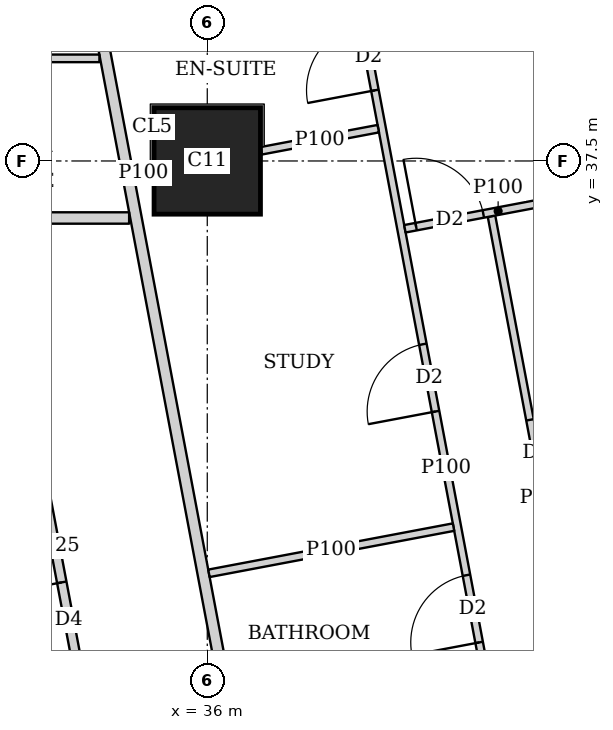
"""IFC4 building model, lengths in metres.
Left out: names, types, materials, properties, quantities, classifications, styles, units other than length and angle.
Written with IfcOpenShell. Run it as: python <this file> out.ifc"""

import sys

from ifc_helpers import new_model, si_unit, direction, frame, frame_2d, origin, origin_2d, place, context, subcontext, project, spatial, rectangle, extrude, element, fill, save


model = new_model("IFC4")
c1 = context("Model", 3, precision=1e-05, world=origin(), true_north=direction((0.0, 1.0)))
c2 = subcontext(c1, "Body", "Model", "MODEL_VIEW")
j1 = project(units=[si_unit("LENGTHUNIT", "METRE"), si_unit("PLANEANGLEUNIT", "RADIAN")], contexts=[c1])
p1 = place(None, origin())
s1 = spatial("IfcSite", under=j1, at=p1, CompositionType="ELEMENT")
p2 = place(p1, origin())
s2 = spatial("IfcBuilding", under=s1, at=p2, CompositionType="ELEMENT")
p3 = place(p2, frame((0.0, 0.0, 289.1)))
s3 = spatial("IfcBuildingStorey", under=s2, at=p3, CompositionType="ELEMENT", Elevation=289.1)
p4 = place(p3, frame((36.0, 37.5, 0.0), z_axis=(0.0, 0.0, 1.0), x_axis=(1.0, 0.0, 0.0)))
e1 = element("IfcColumn", 1, at=p4, inside=s3, PredefinedType="COLUMN", context=c2, shape_type="SweptSolid", body=[
    extrude(rectangle(XDim=1.4, YDim=1.4, at=origin_2d()), origin(), (0.0, 0.0, 1.0), 3.75),
])
p5 = place(p3, frame((29.501, 36.75, 0.0), z_axis=(0.0, 0.0, 1.0), x_axis=(1.0, 0.0, 0.0)))
e2 = element("IfcWall", 2, at=p5, inside=s3, PredefinedType="SOLIDWALL", context=c2, shape_type="SweptSolid", body=[
    extrude(rectangle(XDim=5.471, YDim=0.15, at=frame_2d((2.735, 0.0))), origin(), (0.0, 0.0, 1.0), 3.5),
])
p6 = place(p3, frame((34.036, 42.186, 0.0), z_axis=(0.0, 0.0, 1.0), x_axis=(0.185593518645, -0.9826266055, 0.0)))
e3 = element("IfcWall", 3, at=p6, inside=s3, PredefinedType="SOLIDWALL", context=c2, shape_type="SweptSolid", body=[
    extrude(rectangle(XDim=35.961, YDim=0.15, at=frame_2d((17.98, 0.0))), origin(), (0.0, 0.0, 1.0), 2.5),
])
p7 = place(p6, frame((19.345, 0.0, 0.0)))
e4 = element("IfcOpeningElement", 4, at=p7, cuts=e3, PredefinedType="OPENING", context=c2, shape_type="SweptSolid", body=[
    extrude(rectangle(XDim=1.0, YDim=2.1, at=frame_2d((0.5, 1.05))), frame((0.0, 0.085, 0.0), z_axis=(0.0, -1.0, 0.0), x_axis=(1.0, 0.0, 0.0)), (0.0, 0.0, 1.0), 0.17),
])
p8 = place(p6, frame((33.774, 0.0, 0.0)))
e5 = element("IfcOpeningElement", 5, at=p8, cuts=e3, PredefinedType="OPENING", context=c2, shape_type="SweptSolid", body=[
    extrude(rectangle(XDim=1.0, YDim=2.1, at=frame_2d((0.5, 1.05))), frame((0.0, 0.085, 0.0), z_axis=(0.0, -1.0, 0.0), x_axis=(1.0, 0.0, 0.0)), (0.0, 0.0, 1.0), 0.17),
])
p9 = place(p3, frame((41.054, 37.072, 0.0), z_axis=(0.0, 0.0, 1.0), x_axis=(-0.982579896219, -0.185840650951, 0.0)))
e6 = element("IfcWall", 6, at=p9, inside=s3, PredefinedType="PARTITIONING", context=c2, shape_type="SweptSolid", body=[
    extrude(rectangle(XDim=2.497, YDim=0.1, at=frame_2d((1.249, 0.0))), origin(), (0.0, 0.0, 1.0), 3.5),
])
p10 = place(p9, frame((1.447, 0.0, 0.0)))
e7 = element("IfcOpeningElement", 7, at=p10, cuts=e6, PredefinedType="OPENING", context=c2, shape_type="SweptSolid", body=[
    extrude(rectangle(XDim=0.9, YDim=2.1, at=frame_2d((0.45, 1.05))), frame((0.0, 0.06, 0.0), z_axis=(0.0, -1.0, 0.0), x_axis=(1.0, 0.0, 0.0)), (0.0, 0.0, 1.0), 0.12),
])
p11 = place(p3, frame((38.25, 37.925, 0.0), z_axis=(0.0, 0.0, 1.0), x_axis=(-0.982610209589, -0.185680305934, 0.0)))
e8 = element("IfcWall", 8, at=p11, inside=s3, PredefinedType="PARTITIONING", context=c2, shape_type="SweptSolid", body=[
    extrude(rectangle(XDim=1.567, YDim=0.1, at=frame_2d((0.784, 0.0))), origin(), (0.0, 0.0, 1.0), 3.5),
])
p12 = place(p3, frame((35.29, 37.366, 0.0), z_axis=(0.0, 0.0, 1.0), x_axis=(-0.982395465615, -0.18681313963, 0.0)))
e9 = element("IfcWall", 9, at=p12, inside=s3, PredefinedType="PARTITIONING", context=c2, shape_type="SweptSolid", body=[
    extrude(rectangle(XDim=0.263, YDim=0.1, at=frame_2d((0.131, 0.0))), origin(), (0.0, 0.0, 1.0), 3.5),
])
p13 = place(p3, frame((39.24, 32.683, 0.0), z_axis=(0.0, 0.0, 1.0), x_axis=(-0.982607026909, -0.185697147715, 0.0)))
e10 = element("IfcWall", 10, at=p13, inside=s3, PredefinedType="PARTITIONING", context=c2, shape_type="SweptSolid", body=[
    extrude(rectangle(XDim=3.275, YDim=0.1, at=frame_2d((1.637, 0.0))), origin(), (0.0, 0.0, 1.0), 3.5),
])
p14 = place(p3, frame((37.591, 41.685, 0.0), z_axis=(0.0, 0.0, 1.0), x_axis=(0.185541820726, -0.982636368532, 0.0)))
e11 = element("IfcWall", 11, at=p14, inside=s3, PredefinedType="PARTITIONING", context=c2, shape_type="SweptSolid", body=[
    extrude(rectangle(XDim=16.735, YDim=0.1, at=frame_2d((8.367, 0.0))), origin(), (0.0, 0.0, 1.0), 2.5),
])
p15 = place(p14, frame((2.413, 0.0, 0.0)))
e12 = element("IfcOpeningElement", 12, at=p15, cuts=e11, PredefinedType="OPENING", context=c2, shape_type="SweptSolid", body=[
    extrude(rectangle(XDim=0.9, YDim=2.1, at=frame_2d((0.45, 1.05))), frame((0.0, 0.06, 0.0), z_axis=(0.0, -1.0, 0.0), x_axis=(1.0, 0.0, 0.0)), (0.0, 0.0, 1.0), 0.12),
])
p16 = place(p14, frame((6.713, 0.0, 0.0)))
e13 = element("IfcOpeningElement", 13, at=p16, cuts=e11, PredefinedType="OPENING", context=c2, shape_type="SweptSolid", body=[
    extrude(rectangle(XDim=0.9, YDim=2.1, at=frame_2d((0.45, 1.05))), frame((0.0, 0.06, 0.0), z_axis=(0.0, -1.0, 0.0), x_axis=(1.0, 0.0, 0.0)), (0.0, 0.0, 1.0), 0.12),
])
p17 = place(p14, frame((9.805, 0.0, 0.0)))
e14 = element("IfcOpeningElement", 14, at=p17, cuts=e11, PredefinedType="OPENING", context=c2, shape_type="SweptSolid", body=[
    extrude(rectangle(XDim=0.9, YDim=2.1, at=frame_2d((0.45, 1.05))), frame((0.0, 0.06, 0.0), z_axis=(0.0, -1.0, 0.0), x_axis=(1.0, 0.0, 0.0)), (0.0, 0.0, 1.0), 0.12),
])
p18 = place(p14, frame((11.713, 0.0, 0.0)))
e15 = element("IfcOpeningElement", 15, at=p18, cuts=e11, PredefinedType="OPENING", context=c2, shape_type="SweptSolid", body=[
    extrude(rectangle(XDim=0.9, YDim=2.1, at=frame_2d((0.45, 1.05))), frame((0.0, 0.06, 0.0), z_axis=(0.0, -1.0, 0.0), x_axis=(1.0, 0.0, 0.0)), (0.0, 0.0, 1.0), 0.12),
])
p19 = place(p14, frame((14.426, 0.0, 0.0)))
e16 = element("IfcOpeningElement", 16, at=p19, cuts=e11, PredefinedType="OPENING", context=c2, shape_type="SweptSolid", body=[
    extrude(rectangle(XDim=0.9, YDim=2.1, at=frame_2d((0.45, 1.05))), frame((0.0, 0.06, 0.0), z_axis=(0.0, -1.0, 0.0), x_axis=(1.0, 0.0, 0.0)), (0.0, 0.0, 1.0), 0.12),
])
p20 = place(p3, frame((39.74, 36.773, 0.0), z_axis=(0.0, 0.0, 1.0), x_axis=(0.185583825641, -0.982628436216, 0.0)))
e17 = element("IfcWall", 17, at=p20, inside=s3, PredefinedType="PARTITIONING", context=c2, shape_type="SweptSolid", body=[
    extrude(rectangle(XDim=7.533, YDim=0.1, at=frame_2d((3.766, 0.0))), origin(), (0.0, 0.0, 1.0), 2.5),
])
p21 = place(p20, frame((2.726, 0.0, 0.0)))
e18 = element("IfcOpeningElement", 18, at=p21, cuts=e17, PredefinedType="OPENING", context=c2, shape_type="SweptSolid", body=[
    extrude(rectangle(XDim=0.9, YDim=2.1, at=frame_2d((0.45, 1.05))), frame((0.0, 0.06, 0.0), z_axis=(0.0, -1.0, 0.0), x_axis=(1.0, 0.0, 0.0)), (0.0, 0.0, 1.0), 0.12),
])
p22 = place(p20, frame((6.383, 0.0, 0.0)))
e19 = element("IfcOpeningElement", 19, at=p22, cuts=e17, PredefinedType="OPENING", context=c2, shape_type="SweptSolid", body=[
    extrude(rectangle(XDim=0.9, YDim=2.1, at=frame_2d((0.45, 1.05))), frame((0.0, 0.06, 0.0), z_axis=(0.0, -1.0, 0.0), x_axis=(1.0, 0.0, 0.0)), (0.0, 0.0, 1.0), 0.12),
])
p23 = place(p3, frame((28.8, 38.85, 0.0), z_axis=(0.0, 0.0, 1.0), x_axis=(1.0, 0.0, 0.0)))
e20 = element("IfcWall", 20, at=p23, inside=s3, PredefinedType="PARTITIONING", context=c2, shape_type="SweptSolid", body=[
    extrude(rectangle(XDim=5.781, YDim=0.1, at=frame_2d((2.891, 0.0))), origin(), (0.0, 0.0, 1.0), 3.5),
])
p24 = place(p23, frame((0.75, 0.0, 0.0)))
e21 = element("IfcOpeningElement", 21, at=p24, cuts=e20, PredefinedType="OPENING", context=c2, shape_type="SweptSolid", body=[
    extrude(rectangle(XDim=0.9, YDim=2.1, at=frame_2d((0.45, 1.05))), frame((0.0, 0.06, 0.0), z_axis=(0.0, -1.0, 0.0), x_axis=(1.0, 0.0, 0.0)), (0.0, 0.0, 1.0), 0.12),
])
p25 = place(p23, frame((2.5, 0.0, 0.0)))
e22 = element("IfcOpeningElement", 22, at=p25, cuts=e20, PredefinedType="OPENING", context=c2, shape_type="SweptSolid", body=[
    extrude(rectangle(XDim=0.9, YDim=2.1, at=frame_2d((0.45, 1.05))), frame((0.0, 0.06, 0.0), z_axis=(0.0, -1.0, 0.0), x_axis=(1.0, 0.0, 0.0)), (0.0, 0.0, 1.0), 0.12),
])
p26 = place(p23, frame((3.85, 0.0, 0.0)))
e23 = element("IfcOpeningElement", 23, at=p26, cuts=e20, PredefinedType="OPENING", context=c2, shape_type="SweptSolid", body=[
    extrude(rectangle(XDim=0.9, YDim=2.1, at=frame_2d((0.45, 1.05))), frame((0.0, 0.06, 0.0), z_axis=(0.0, -1.0, 0.0), x_axis=(1.0, 0.0, 0.0)), (0.0, 0.0, 1.0), 0.12),
])
p27 = place(p3, frame((34.448, 30.04, 0.0), z_axis=(0.0, 0.0, 1.0), x_axis=(-0.185749459238, 0.982597139418, 0.0)))
e24 = element("IfcWall", 24, at=p27, inside=s3, PredefinedType="PARTITIONING", context=c2, shape_type="SweptSolid", body=[
    extrude(rectangle(XDim=4.883, YDim=0.125, at=frame_2d((2.441, 0.0))), origin(), (0.0, 0.0, 1.0), 2.5),
])
p28 = place(p27, frame((0.95, 0.0, 0.0)))
e25 = element("IfcOpeningElement", 25, at=p28, cuts=e24, PredefinedType="OPENING", context=c2, shape_type="SweptSolid", body=[
    extrude(rectangle(XDim=1.0, YDim=2.1, at=frame_2d((0.5, 1.05))), frame((0.0, 0.073, 0.0), z_axis=(0.0, -1.0, 0.0), x_axis=(1.0, 0.0, 0.0)), (0.0, 0.0, 1.0), 0.145),
])
p29 = place(p27, frame((3.225, 0.0, 0.0)))
e26 = element("IfcOpeningElement", 26, at=p29, cuts=e24, PredefinedType="OPENING", context=c2, shape_type="SweptSolid", body=[
    extrude(rectangle(XDim=1.0, YDim=2.1, at=frame_2d((0.5, 1.05))), frame((0.0, 0.073, 0.0), z_axis=(0.0, -1.0, 0.0), x_axis=(1.0, 0.0, 0.0)), (0.0, 0.0, 1.0), 0.145),
])
p30 = place(p10, origin())
e27 = element("IfcDoor", 27, at=p30, inside=s3, OperationType="SINGLE_SWING_LEFT", PredefinedType="DOOR", context=c2, shape_type="SweptSolid", body=[
    extrude(rectangle(XDim=0.9, YDim=2.1, at=frame_2d((0.45, 1.05))), frame((0.0, 0.025, 0.0), z_axis=(0.0, -1.0, 0.0), x_axis=(1.0, 0.0, 0.0)), (0.0, 0.0, 1.0), 0.05),
])
fill(e7, e27)
p31 = place(p15, origin())
e28 = element("IfcDoor", 28, at=p31, inside=s3, OperationType="SINGLE_SWING_LEFT", PredefinedType="DOOR", context=c2, shape_type="SweptSolid", body=[
    extrude(rectangle(XDim=0.9, YDim=2.1, at=frame_2d((0.45, 1.05))), frame((0.0, 0.025, 0.0), z_axis=(0.0, -1.0, 0.0), x_axis=(1.0, 0.0, 0.0)), (0.0, 0.0, 1.0), 0.05),
])
fill(e12, e28)
p32 = place(p16, origin())
e29 = element("IfcDoor", 29, at=p32, inside=s3, OperationType="SINGLE_SWING_LEFT", PredefinedType="DOOR", context=c2, shape_type="SweptSolid", body=[
    extrude(rectangle(XDim=0.9, YDim=2.1, at=frame_2d((0.45, 1.05))), frame((0.0, 0.025, 0.0), z_axis=(0.0, -1.0, 0.0), x_axis=(1.0, 0.0, 0.0)), (0.0, 0.0, 1.0), 0.05),
])
fill(e13, e29)
p33 = place(p17, origin())
e30 = element("IfcDoor", 30, at=p33, inside=s3, OperationType="SINGLE_SWING_LEFT", PredefinedType="DOOR", context=c2, shape_type="SweptSolid", body=[
    extrude(rectangle(XDim=0.9, YDim=2.1, at=frame_2d((0.45, 1.05))), frame((0.0, 0.025, 0.0), z_axis=(0.0, -1.0, 0.0), x_axis=(1.0, 0.0, 0.0)), (0.0, 0.0, 1.0), 0.05),
])
fill(e14, e30)
p34 = place(p21, origin())
e31 = element("IfcDoor", 31, at=p34, inside=s3, OperationType="SINGLE_SWING_RIGHT", PredefinedType="DOOR", context=c2, shape_type="SweptSolid", body=[
    extrude(rectangle(XDim=0.9, YDim=2.1, at=frame_2d((0.45, 1.05))), frame((0.0, 0.025, 0.0), z_axis=(0.0, -1.0, 0.0), x_axis=(1.0, 0.0, 0.0)), (0.0, 0.0, 1.0), 0.05),
])
fill(e18, e31)
p35 = place(p28, origin())
e32 = element("IfcDoor", 32, at=p35, inside=s3, OperationType="SINGLE_SWING_RIGHT", PredefinedType="DOOR", context=c2, shape_type="SweptSolid", body=[
    extrude(rectangle(XDim=1.0, YDim=2.1, at=frame_2d((0.5, 1.05))), frame((0.0, 0.025, 0.0), z_axis=(0.0, -1.0, 0.0), x_axis=(1.0, 0.0, 0.0)), (0.0, 0.0, 1.0), 0.05),
])
fill(e25, e32)
save(model, sys.argv[1])
